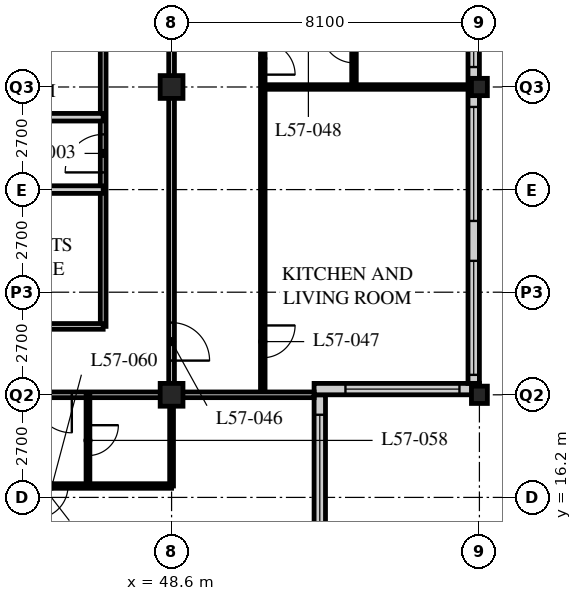
"""IFC4 building model, lengths in metres.
Left out: names, types, materials, properties, quantities, classifications, styles, units other than length and angle.
Written with IfcOpenShell. Run it as: python <this file> out.ifc"""

import sys

from ifc_helpers import new_model, si_unit, direction, frame, frame_2d, origin, origin_2d, place, context, subcontext, project, spatial, rectangle, hollow_rectangle, i_section, extrude, element, fill, save


model = new_model("IFC4")
c1 = context("Model", 3, precision=1e-05, world=origin(), true_north=direction((0.0, 1.0)))
c2 = subcontext(c1, "Body", "Model", "MODEL_VIEW")
j1 = project(units=[si_unit("LENGTHUNIT", "METRE"), si_unit("PLANEANGLEUNIT", "RADIAN")], contexts=[c1])
p1 = place(None, origin())
s1 = spatial("IfcSite", under=j1, at=p1, CompositionType="ELEMENT")
p2 = place(p1, origin())
s2 = spatial("IfcBuilding", under=s1, at=p2, CompositionType="ELEMENT")
p3 = place(p2, frame((0.0, 0.0, 220.8)))
s3 = spatial("IfcBuildingStorey", under=s2, at=p3, CompositionType="ELEMENT", Elevation=220.8)
for number, where, z_axis, x_axis in (
    (1, (48.6, 18.9, 0.0), (0.0, 0.0, 1.0), (1.0, 0.0, 0.0)),
    (2, (48.6, 27.0, 0.0), (0.0, 0.0, 1.0), (1.0, 0.0, 0.0)),
):
    element("IfcColumn", number, at=place(p3, frame(where, z_axis=z_axis, x_axis=x_axis)), inside=s3, PredefinedType="COLUMN", context=c2, shape_type="SweptSolid", body=[
        extrude(hollow_rectangle(XDim=0.6, YDim=0.6, WallThickness=0.05, at=origin_2d()), origin(), (0.0, 0.0, 1.0), 3.6),
    ])
for number, where, z_axis, x_axis in (
    (3, (56.7, 18.9, 0.0), (0.0, 0.0, 1.0), (1.0, 0.0, 0.0)),
    (4, (56.7, 27.0, 0.0), (0.0, 0.0, 1.0), (1.0, 0.0, 0.0)),
):
    element("IfcColumn", number, at=place(p3, frame(where, z_axis=z_axis, x_axis=x_axis)), inside=s3, PredefinedType="COLUMN", context=c2, shape_type="SweptSolid", body=[
        extrude(i_section(OverallWidth=0.418, OverallDepth=0.456, WebThickness=0.042, FlangeThickness=0.067, FilletRadius=0.015, at=origin_2d()), origin(), (0.0, 0.0, 1.0), 3.6),
    ])
p4 = place(p3, frame((52.5, 15.15, 0.0), z_axis=(0.0, 0.0, 1.0), x_axis=(0.0, 1.0, 0.0)))
e5 = element("IfcWall", 5, at=p4, inside=s3, PredefinedType="SOLIDWALL", context=c2, shape_type="SweptSolid", body=[
    extrude(rectangle(XDim=3.75, YDim=0.3, at=frame_2d((1.875, 0.0))), origin(), (0.0, 0.0, 1.0), 3.39),
])
p5 = place(p4, frame((0.225, 0.0, 0.6)))
e6 = element("IfcOpeningElement", 6, at=p5, cuts=e5, PredefinedType="OPENING", context=c2, shape_type="SweptSolid", body=[
    extrude(rectangle(XDim=3.0, YDim=2.0, at=frame_2d((1.5, 1.0))), frame((0.0, 0.16, 0.0), z_axis=(0.0, -1.0, 0.0), x_axis=(1.0, 0.0, 0.0)), (0.0, 0.0, 1.0), 0.32),
])
p6 = place(p3, frame((52.35, 19.05, 0.0), z_axis=(0.0, 0.0, 1.0), x_axis=(1.0, 0.0, 0.0)))
e7 = element("IfcWall", 7, at=p6, inside=s3, PredefinedType="SOLIDWALL", context=c2, shape_type="SweptSolid", body=[
    extrude(rectangle(XDim=4.35, YDim=0.3, at=frame_2d((2.175, 0.0))), origin(), (0.0, 0.0, 1.0), 3.39),
])
p7 = place(p6, frame((0.825, 0.0, 0.6)))
e8 = element("IfcOpeningElement", 8, at=p7, cuts=e7, PredefinedType="OPENING", context=c2, shape_type="SweptSolid", body=[
    extrude(rectangle(XDim=3.0, YDim=2.0, at=frame_2d((1.5, 1.0))), frame((0.0, 0.16, 0.0), z_axis=(0.0, -1.0, 0.0), x_axis=(1.0, 0.0, 0.0)), (0.0, 0.0, 1.0), 0.32),
])
p8 = place(p3, frame((56.55, 19.2, 0.0), z_axis=(0.0, 0.0, 1.0), x_axis=(0.0, 1.0, 0.0)))
e9 = element("IfcWall", 9, at=p8, inside=s3, PredefinedType="SOLIDWALL", context=c2, shape_type="SweptSolid", body=[
    extrude(rectangle(XDim=32.1, YDim=0.3, at=frame_2d((16.05, 0.0))), origin(), (0.0, 0.0, 1.0), 3.39),
])
p9 = place(p8, frame((0.225, 0.0, 0.6)))
e10 = element("IfcOpeningElement", 10, at=p9, cuts=e9, PredefinedType="OPENING", context=c2, shape_type="SweptSolid", body=[
    extrude(rectangle(XDim=3.0, YDim=2.0, at=frame_2d((1.5, 1.0))), frame((0.0, 0.16, 0.0), z_axis=(0.0, -1.0, 0.0), x_axis=(1.0, 0.0, 0.0)), (0.0, 0.0, 1.0), 0.32),
])
p10 = place(p8, frame((4.275, 0.0, 0.6)))
e11 = element("IfcOpeningElement", 11, at=p10, cuts=e9, PredefinedType="OPENING", context=c2, shape_type="SweptSolid", body=[
    extrude(rectangle(XDim=3.0, YDim=2.0, at=frame_2d((1.5, 1.0))), frame((0.0, 0.16, 0.0), z_axis=(0.0, -1.0, 0.0), x_axis=(1.0, 0.0, 0.0)), (0.0, 0.0, 1.0), 0.32),
])
p11 = place(p8, frame((8.325, 0.0, 0.6)))
e12 = element("IfcOpeningElement", 12, at=p11, cuts=e9, PredefinedType="OPENING", context=c2, shape_type="SweptSolid", body=[
    extrude(rectangle(XDim=3.0, YDim=2.0, at=frame_2d((1.5, 1.0))), frame((0.0, 0.16, 0.0), z_axis=(0.0, -1.0, 0.0), x_axis=(1.0, 0.0, 0.0)), (0.0, 0.0, 1.0), 0.32),
])
p12 = place(p8, frame((12.375, 0.0, 0.6)))
e13 = element("IfcOpeningElement", 13, at=p12, cuts=e9, PredefinedType="OPENING", context=c2, shape_type="SweptSolid", body=[
    extrude(rectangle(XDim=3.0, YDim=2.0, at=frame_2d((1.5, 1.0))), frame((0.0, 0.16, 0.0), z_axis=(0.0, -1.0, 0.0), x_axis=(1.0, 0.0, 0.0)), (0.0, 0.0, 1.0), 0.32),
])
p13 = place(p8, frame((16.425, 0.0, 0.6)))
e14 = element("IfcOpeningElement", 14, at=p13, cuts=e9, PredefinedType="OPENING", context=c2, shape_type="SweptSolid", body=[
    extrude(rectangle(XDim=3.0, YDim=2.0, at=frame_2d((1.5, 1.0))), frame((0.0, 0.16, 0.0), z_axis=(0.0, -1.0, 0.0), x_axis=(1.0, 0.0, 0.0)), (0.0, 0.0, 1.0), 0.32),
])
p14 = place(p8, frame((20.475, 0.0, 0.6)))
e15 = element("IfcOpeningElement", 15, at=p14, cuts=e9, PredefinedType="OPENING", context=c2, shape_type="SweptSolid", body=[
    extrude(rectangle(XDim=3.0, YDim=2.0, at=frame_2d((1.5, 1.0))), frame((0.0, 0.16, 0.0), z_axis=(0.0, -1.0, 0.0), x_axis=(1.0, 0.0, 0.0)), (0.0, 0.0, 1.0), 0.32),
])
p15 = place(p8, frame((24.525, 0.0, 0.6)))
e16 = element("IfcOpeningElement", 16, at=p15, cuts=e9, PredefinedType="OPENING", context=c2, shape_type="SweptSolid", body=[
    extrude(rectangle(XDim=3.0, YDim=2.0, at=frame_2d((1.5, 1.0))), frame((0.0, 0.16, 0.0), z_axis=(0.0, -1.0, 0.0), x_axis=(1.0, 0.0, 0.0)), (0.0, 0.0, 1.0), 0.32),
])
p16 = place(p8, frame((28.575, 0.0, 0.6)))
e17 = element("IfcOpeningElement", 17, at=p16, cuts=e9, PredefinedType="OPENING", context=c2, shape_type="SweptSolid", body=[
    extrude(rectangle(XDim=3.0, YDim=2.0, at=frame_2d((1.5, 1.0))), frame((0.0, 0.16, 0.0), z_axis=(0.0, -1.0, 0.0), x_axis=(1.0, 0.0, 0.0)), (0.0, 0.0, 1.0), 0.32),
])
p17 = place(p3, frame((12.15, 18.9, 0.0), z_axis=(0.0, 0.0, 1.0), x_axis=(1.0, 0.0, 0.0)))
e18 = element("IfcWall", 18, at=p17, inside=s3, PredefinedType="PARTITIONING", context=c2, shape_type="SweptSolid", body=[
    extrude(rectangle(XDim=36.45, YDim=0.15, at=frame_2d((18.225, 0.0))), origin(), (0.0, 0.0, 1.0), 2.628),
])
p18 = place(p17, frame((4.95, 0.0, 0.0)))
e19 = element("IfcOpeningElement", 19, at=p18, cuts=e18, PredefinedType="OPENING", context=c2, shape_type="SweptSolid", body=[
    extrude(rectangle(XDim=1.0, YDim=2.1, at=frame_2d((0.5, 1.05))), frame((0.0, 0.085, 0.0), z_axis=(0.0, -1.0, 0.0), x_axis=(1.0, 0.0, 0.0)), (0.0, 0.0, 1.0), 0.17),
])
p19 = place(p17, frame((22.6, 0.0, 0.0)))
e20 = element("IfcOpeningElement", 20, at=p19, cuts=e18, PredefinedType="OPENING", context=c2, shape_type="SweptSolid", body=[
    extrude(rectangle(XDim=1.0, YDim=2.1, at=frame_2d((0.5, 1.05))), frame((0.0, 0.085, 0.0), z_axis=(0.0, -1.0, 0.0), x_axis=(1.0, 0.0, 0.0)), (0.0, 0.0, 1.0), 0.17),
])
p20 = place(p17, frame((25.0, 0.0, 0.0)))
e21 = element("IfcOpeningElement", 21, at=p20, cuts=e18, PredefinedType="OPENING", context=c2, shape_type="SweptSolid", body=[
    extrude(rectangle(XDim=1.0, YDim=2.1, at=frame_2d((0.5, 1.05))), frame((0.0, 0.085, 0.0), z_axis=(0.0, -1.0, 0.0), x_axis=(1.0, 0.0, 0.0)), (0.0, 0.0, 1.0), 0.17),
])
p21 = place(p17, frame((30.7, 0.0, 0.0)))
e22 = element("IfcOpeningElement", 22, at=p21, cuts=e18, PredefinedType="OPENING", context=c2, shape_type="SweptSolid", body=[
    extrude(rectangle(XDim=1.0, YDim=2.1, at=frame_2d((0.5, 1.05))), frame((0.0, 0.085, 0.0), z_axis=(0.0, -1.0, 0.0), x_axis=(1.0, 0.0, 0.0)), (0.0, 0.0, 1.0), 0.17),
])
p22 = place(p17, frame((1.525, 0.0, 0.0)))
e23 = element("IfcOpeningElement", 23, at=p22, cuts=e18, PredefinedType="OPENING", context=c2, shape_type="SweptSolid", body=[
    extrude(rectangle(XDim=1.0, YDim=2.1, at=frame_2d((0.5, 1.05))), frame((0.0, 0.085, 0.0), z_axis=(0.0, -1.0, 0.0), x_axis=(1.0, 0.0, 0.0)), (0.0, 0.0, 1.0), 0.17),
])
p23 = place(p17, frame((32.825, 0.0, 0.0)))
e24 = element("IfcOpeningElement", 24, at=p23, cuts=e18, PredefinedType="OPENING", context=c2, shape_type="SweptSolid", body=[
    extrude(rectangle(XDim=1.0, YDim=2.1, at=frame_2d((0.5, 1.05))), frame((0.0, 0.085, 0.0), z_axis=(0.0, -1.0, 0.0), x_axis=(1.0, 0.0, 0.0)), (0.0, 0.0, 1.0), 0.17),
])
p24 = place(p3, frame((48.6, 18.9, 0.0), z_axis=(0.0, 0.0, 1.0), x_axis=(0.0, 1.0, 0.0)))
e25 = element("IfcWall", 25, at=p24, inside=s3, PredefinedType="PARTITIONING", context=c2, shape_type="SweptSolid", body=[
    extrude(rectangle(XDim=24.3, YDim=0.15, at=frame_2d((12.15, 0.0))), origin(), (0.0, 0.0, 1.0), 2.628),
])
p25 = place(p24, frame((0.9, 0.0, 0.0)))
e26 = element("IfcOpeningElement", 26, at=p25, cuts=e25, PredefinedType="OPENING", context=c2, shape_type="SweptSolid", body=[
    extrude(rectangle(XDim=1.0, YDim=2.1, at=frame_2d((0.5, 1.05))), frame((0.0, 0.085, 0.0), z_axis=(0.0, -1.0, 0.0), x_axis=(1.0, 0.0, 0.0)), (0.0, 0.0, 1.0), 0.17),
])
p26 = place(p24, frame((20.95, 0.0, 0.0)))
e27 = element("IfcOpeningElement", 27, at=p26, cuts=e25, PredefinedType="OPENING", context=c2, shape_type="SweptSolid", body=[
    extrude(rectangle(XDim=1.0, YDim=2.1, at=frame_2d((0.5, 1.05))), frame((0.0, 0.085, 0.0), z_axis=(0.0, -1.0, 0.0), x_axis=(1.0, 0.0, 0.0)), (0.0, 0.0, 1.0), 0.17),
])
p27 = place(p3, frame((46.8, 20.7, 0.0), z_axis=(0.0, 0.0, 1.0), x_axis=(0.0, 1.0, 0.0)))
e28 = element("IfcWall", 28, at=p27, inside=s3, PredefinedType="PARTITIONING", context=c2, shape_type="SweptSolid", body=[
    extrude(rectangle(XDim=19.8, YDim=0.15, at=frame_2d((9.9, 0.0))), origin(), (0.0, 0.0, 1.0), 3.39),
])
p28 = place(p27, frame((4.052, 0.0, 0.0)))
e29 = element("IfcOpeningElement", 29, at=p28, cuts=e28, PredefinedType="OPENING", context=c2, shape_type="SweptSolid", body=[
    extrude(rectangle(XDim=1.0, YDim=2.1, at=frame_2d((0.5, 1.05))), frame((0.0, 0.085, 0.0), z_axis=(0.0, -1.0, 0.0), x_axis=(1.0, 0.0, 0.0)), (0.0, 0.0, 1.0), 0.17),
])
p29 = place(p27, frame((8.102, 0.0, 0.0)))
e30 = element("IfcOpeningElement", 30, at=p29, cuts=e28, PredefinedType="OPENING", context=c2, shape_type="SweptSolid", body=[
    extrude(rectangle(XDim=1.0, YDim=2.1, at=frame_2d((0.5, 1.05))), frame((0.0, 0.085, 0.0), z_axis=(0.0, -1.0, 0.0), x_axis=(1.0, 0.0, 0.0)), (0.0, 0.0, 1.0), 0.17),
])
p30 = place(p27, frame((13.502, 0.0, 0.0)))
e31 = element("IfcOpeningElement", 31, at=p30, cuts=e28, PredefinedType="OPENING", context=c2, shape_type="SweptSolid", body=[
    extrude(rectangle(XDim=1.0, YDim=2.1, at=frame_2d((0.5, 1.05))), frame((0.0, 0.085, 0.0), z_axis=(0.0, -1.0, 0.0), x_axis=(1.0, 0.0, 0.0)), (0.0, 0.0, 1.0), 0.17),
])
p31 = place(p27, frame((17.552, 0.0, 0.0)))
e32 = element("IfcOpeningElement", 32, at=p31, cuts=e28, PredefinedType="OPENING", context=c2, shape_type="SweptSolid", body=[
    extrude(rectangle(XDim=1.0, YDim=2.1, at=frame_2d((0.5, 1.05))), frame((0.0, 0.085, 0.0), z_axis=(0.0, -1.0, 0.0), x_axis=(1.0, 0.0, 0.0)), (0.0, 0.0, 1.0), 0.17),
])
p32 = place(p3, frame((29.56, 20.7, 0.0), z_axis=(0.0, 0.0, 1.0), x_axis=(1.0, 0.0, 0.0)))
e33 = element("IfcWall", 33, at=p32, inside=s3, PredefinedType="PARTITIONING", context=c2, shape_type="SweptSolid", body=[
    extrude(rectangle(XDim=17.24, YDim=0.15, at=frame_2d((8.62, 0.0))), origin(), (0.0, 0.0, 1.0), 3.39),
])
p33 = place(p32, frame((4.965, 0.0, 0.0)))
e34 = element("IfcOpeningElement", 34, at=p33, cuts=e33, PredefinedType="OPENING", context=c2, shape_type="SweptSolid", body=[
    extrude(rectangle(XDim=1.0, YDim=2.1, at=frame_2d((0.5, 1.05))), frame((0.0, 0.085, 0.0), z_axis=(0.0, -1.0, 0.0), x_axis=(1.0, 0.0, 0.0)), (0.0, 0.0, 1.0), 0.17),
])
p34 = place(p32, frame((11.412, 0.0, 0.0)))
e35 = element("IfcOpeningElement", 35, at=p34, cuts=e33, PredefinedType="OPENING", context=c2, shape_type="SweptSolid", body=[
    extrude(rectangle(XDim=1.0, YDim=2.1, at=frame_2d((0.5, 1.05))), frame((0.0, 0.085, 0.0), z_axis=(0.0, -1.0, 0.0), x_axis=(1.0, 0.0, 0.0)), (0.0, 0.0, 1.0), 0.17),
])
p35 = place(p32, frame((14.562, 0.0, 0.0)))
e36 = element("IfcOpeningElement", 36, at=p35, cuts=e33, PredefinedType="OPENING", context=c2, shape_type="SweptSolid", body=[
    extrude(rectangle(XDim=1.0, YDim=2.1, at=frame_2d((0.5, 1.05))), frame((0.0, 0.085, 0.0), z_axis=(0.0, -1.0, 0.0), x_axis=(1.0, 0.0, 0.0)), (0.0, 0.0, 1.0), 0.17),
])
for number, where, z_axis, x_axis in (
    (37, (46.8, 26.205, 0.0), (0.0, 0.0, 1.0), (-1.0, 0.0, 0.0)),
    (38, (40.5, 24.3, 0.0), (0.0, 0.0, 1.0), (1.0, 0.0, 0.0)),
):
    element("IfcWall", number, at=place(p3, frame(where, z_axis=z_axis, x_axis=x_axis)), inside=s3, PredefinedType="SOLIDWALL", context=c2, shape_type="SweptSolid", body=[
        extrude(rectangle(XDim=6.3, YDim=0.2, at=frame_2d((3.15, 0.0))), origin(), (0.0, 0.0, 1.0), 3.39),
    ])
p36 = place(p3, frame((51.0, 18.9, 0.0), z_axis=(0.0, 0.0, 1.0), x_axis=(0.0, 1.0, 0.0)))
e39 = element("IfcWall", 39, at=p36, inside=s3, PredefinedType="PARTITIONING", context=c2, shape_type="SweptSolid", body=[
    extrude(rectangle(XDim=20.25, YDim=0.12, at=frame_2d((10.125, 0.0))), origin(), (0.0, 0.0, 1.0), 3.39),
])
p37 = place(p36, frame((0.975, 0.0, 0.0)))
e40 = element("IfcOpeningElement", 40, at=p37, cuts=e39, PredefinedType="OPENING", context=c2, shape_type="SweptSolid", body=[
    extrude(rectangle(XDim=0.85, YDim=2.1, at=frame_2d((0.425, 1.05))), frame((0.0, 0.07, 0.0), z_axis=(0.0, -1.0, 0.0), x_axis=(1.0, 0.0, 0.0)), (0.0, 0.0, 1.0), 0.14),
])
p38 = place(p36, frame((8.425, 0.0, 0.0)))
e41 = element("IfcOpeningElement", 41, at=p38, cuts=e39, PredefinedType="OPENING", context=c2, shape_type="SweptSolid", body=[
    extrude(rectangle(XDim=0.85, YDim=2.1, at=frame_2d((0.425, 1.05))), frame((0.0, 0.07, 0.0), z_axis=(0.0, -1.0, 0.0), x_axis=(1.0, 0.0, 0.0)), (0.0, 0.0, 1.0), 0.14),
])
p39 = place(p36, frame((12.475, 0.0, 0.0)))
e42 = element("IfcOpeningElement", 42, at=p39, cuts=e39, PredefinedType="OPENING", context=c2, shape_type="SweptSolid", body=[
    extrude(rectangle(XDim=0.85, YDim=2.1, at=frame_2d((0.425, 1.05))), frame((0.0, 0.07, 0.0), z_axis=(0.0, -1.0, 0.0), x_axis=(1.0, 0.0, 0.0)), (0.0, 0.0, 1.0), 0.14),
])
p40 = place(p36, frame((16.525, 0.0, 0.0)))
e43 = element("IfcOpeningElement", 43, at=p40, cuts=e39, PredefinedType="OPENING", context=c2, shape_type="SweptSolid", body=[
    extrude(rectangle(XDim=0.85, YDim=2.1, at=frame_2d((0.425, 1.05))), frame((0.0, 0.07, 0.0), z_axis=(0.0, -1.0, 0.0), x_axis=(1.0, 0.0, 0.0)), (0.0, 0.0, 1.0), 0.14),
])
p41 = place(p3, frame((51.0, 27.0, 0.0), z_axis=(0.0, 0.0, 1.0), x_axis=(1.0, 0.0, 0.0)))
e44 = element("IfcWall", 44, at=p41, inside=s3, PredefinedType="PARTITIONING", context=c2, shape_type="SweptSolid", body=[
    extrude(rectangle(XDim=5.4, YDim=0.12, at=frame_2d((2.7, 0.0))), origin(), (0.0, 0.0, 1.0), 2.628),
])
p42 = place(p3, frame((44.55, 16.5, 0.0), z_axis=(0.0, 0.0, 1.0), x_axis=(1.0, 0.0, 0.0)))
e45 = element("IfcWall", 45, at=p42, inside=s3, PredefinedType="PARTITIONING", context=c2, shape_type="SweptSolid", body=[
    extrude(rectangle(XDim=4.05, YDim=0.12, at=frame_2d((2.025, 0.0))), origin(), (0.0, 0.0, 1.0), 3.39),
])
p43 = place(p42, frame((0.475, 0.0, 0.0)))
e46 = element("IfcOpeningElement", 46, at=p43, cuts=e45, PredefinedType="OPENING", context=c2, shape_type="SweptSolid", body=[
    extrude(rectangle(XDim=0.85, YDim=2.1, at=frame_2d((0.425, 1.05))), frame((0.0, 0.07, 0.0), z_axis=(0.0, -1.0, 0.0), x_axis=(1.0, 0.0, 0.0)), (0.0, 0.0, 1.0), 0.14),
])
p44 = place(p3, frame((46.4, 18.9, 0.0), z_axis=(0.0, 0.0, 1.0), x_axis=(0.0, -1.0, 0.0)))
e47 = element("IfcWall", 47, at=p44, inside=s3, PredefinedType="PARTITIONING", context=c2, shape_type="SweptSolid", body=[
    extrude(rectangle(XDim=2.4, YDim=0.1, at=frame_2d((1.2, 0.0))), origin(), (0.0, 0.0, 1.0), 3.39),
])
p45 = place(p44, frame((0.8, 0.0, 0.0)))
e48 = element("IfcOpeningElement", 48, at=p45, cuts=e47, PredefinedType="OPENING", context=c2, shape_type="SweptSolid", body=[
    extrude(rectangle(XDim=0.8, YDim=2.1, at=frame_2d((0.4, 1.05))), frame((0.0, 0.06, 0.0), z_axis=(0.0, -1.0, 0.0), x_axis=(1.0, 0.0, 0.0)), (0.0, 0.0, 1.0), 0.12),
])
p46 = place(p3, frame((48.6, 18.9, 0.0), z_axis=(0.0, 0.0, 1.0), x_axis=(0.0, -1.0, 0.0)))
e49 = element("IfcWall", 49, at=p46, inside=s3, PredefinedType="PARTITIONING", context=c2, shape_type="SweptSolid", body=[
    extrude(rectangle(XDim=2.4, YDim=0.1, at=frame_2d((1.2, 0.0))), origin(), (0.0, 0.0, 1.0), 2.628),
])
p47 = place(p3, frame((48.6, 18.9, 0.0), z_axis=(0.0, 0.0, 1.0), x_axis=(1.0, 0.0, 0.0)))
e50 = element("IfcWall", 50, at=p47, inside=s3, PredefinedType="PARTITIONING", context=c2, shape_type="SweptSolid", body=[
    extrude(rectangle(XDim=3.75, YDim=0.15, at=frame_2d((1.875, 0.0))), origin(), (0.0, 0.0, 1.0), 2.628),
])
p48 = place(p3, frame((53.4, 28.76, 0.0), z_axis=(0.0, 0.0, 1.0), x_axis=(0.0, -1.0, 0.0)))
e51 = element("IfcWall", 51, at=p48, inside=s3, PredefinedType="PARTITIONING", context=c2, shape_type="SweptSolid", body=[
    extrude(rectangle(XDim=1.76, YDim=0.12, at=frame_2d((0.88, 0.0))), origin(), (0.0, 0.0, 1.0), 3.39),
])
p49 = place(p48, frame((0.275, 0.0, 0.0)))
e52 = element("IfcOpeningElement", 52, at=p49, cuts=e51, PredefinedType="OPENING", context=c2, shape_type="SweptSolid", body=[
    extrude(rectangle(XDim=0.85, YDim=2.1, at=frame_2d((0.425, 1.05))), frame((0.0, 0.07, 0.0), z_axis=(0.0, -1.0, 0.0), x_axis=(1.0, 0.0, 0.0)), (0.0, 0.0, 1.0), 0.14),
])
p50 = place(p5, origin())
e53 = element("IfcWindow", 53, at=p50, inside=s3, PartitioningType="SINGLE_PANEL", PredefinedType="WINDOW", context=c2, shape_type="SweptSolid", body=[
    extrude(rectangle(XDim=3.0, YDim=2.0, at=frame_2d((1.5, 1.0))), frame((0.0, 0.03, 0.0), z_axis=(0.0, -1.0, 0.0), x_axis=(1.0, 0.0, 0.0)), (0.0, 0.0, 1.0), 0.06),
])
fill(e6, e53)
p51 = place(p7, origin())
e54 = element("IfcWindow", 54, at=p51, inside=s3, PartitioningType="SINGLE_PANEL", PredefinedType="WINDOW", context=c2, shape_type="SweptSolid", body=[
    extrude(rectangle(XDim=3.0, YDim=2.0, at=frame_2d((1.5, 1.0))), frame((0.0, 0.03, 0.0), z_axis=(0.0, -1.0, 0.0), x_axis=(1.0, 0.0, 0.0)), (0.0, 0.0, 1.0), 0.06),
])
fill(e8, e54)
p52 = place(p9, origin())
e55 = element("IfcWindow", 55, at=p52, inside=s3, PartitioningType="SINGLE_PANEL", PredefinedType="WINDOW", context=c2, shape_type="SweptSolid", body=[
    extrude(rectangle(XDim=3.0, YDim=2.0, at=frame_2d((1.5, 1.0))), frame((0.0, 0.03, 0.0), z_axis=(0.0, -1.0, 0.0), x_axis=(1.0, 0.0, 0.0)), (0.0, 0.0, 1.0), 0.06),
])
fill(e10, e55)
p53 = place(p10, origin())
e56 = element("IfcWindow", 56, at=p53, inside=s3, PartitioningType="SINGLE_PANEL", PredefinedType="WINDOW", context=c2, shape_type="SweptSolid", body=[
    extrude(rectangle(XDim=3.0, YDim=2.0, at=frame_2d((1.5, 1.0))), frame((0.0, 0.03, 0.0), z_axis=(0.0, -1.0, 0.0), x_axis=(1.0, 0.0, 0.0)), (0.0, 0.0, 1.0), 0.06),
])
fill(e11, e56)
p54 = place(p11, origin())
e57 = element("IfcWindow", 57, at=p54, inside=s3, PartitioningType="SINGLE_PANEL", PredefinedType="WINDOW", context=c2, shape_type="SweptSolid", body=[
    extrude(rectangle(XDim=3.0, YDim=2.0, at=frame_2d((1.5, 1.0))), frame((0.0, 0.03, 0.0), z_axis=(0.0, -1.0, 0.0), x_axis=(1.0, 0.0, 0.0)), (0.0, 0.0, 1.0), 0.06),
])
fill(e12, e57)
p55 = place(p28, origin())
e58 = element("IfcDoor", 58, at=p55, inside=s3, OperationType="SINGLE_SWING_LEFT", PredefinedType="DOOR", context=c2, shape_type="SweptSolid", body=[
    extrude(rectangle(XDim=1.0, YDim=2.1, at=frame_2d((0.5, 1.05))), frame((0.0, 0.025, 0.0), z_axis=(0.0, -1.0, 0.0), x_axis=(1.0, 0.0, 0.0)), (0.0, 0.0, 1.0), 0.05),
])
fill(e29, e58)
p56 = place(p25, origin())
e59 = element("IfcDoor", 59, at=p56, inside=s3, OperationType="SINGLE_SWING_RIGHT", PredefinedType="DOOR", context=c2, shape_type="SweptSolid", body=[
    extrude(rectangle(XDim=1.0, YDim=2.1, at=frame_2d((0.5, 1.05))), frame((0.0, 0.025, 0.0), z_axis=(0.0, -1.0, 0.0), x_axis=(1.0, 0.0, 0.0)), (0.0, 0.0, 1.0), 0.05),
])
fill(e26, e59)
p57 = place(p37, origin())
e60 = element("IfcDoor", 60, at=p57, inside=s3, OperationType="SINGLE_SWING_LEFT", PredefinedType="DOOR", context=c2, shape_type="SweptSolid", body=[
    extrude(rectangle(XDim=0.85, YDim=2.1, at=frame_2d((0.425, 1.05))), frame((0.0, 0.025, 0.0), z_axis=(0.0, -1.0, 0.0), x_axis=(1.0, 0.0, 0.0)), (0.0, 0.0, 1.0), 0.05),
])
fill(e40, e60)
p58 = place(p38, origin())
e61 = element("IfcDoor", 61, at=p58, inside=s3, OperationType="SINGLE_SWING_RIGHT", PredefinedType="DOOR", context=c2, shape_type="SweptSolid", body=[
    extrude(rectangle(XDim=0.85, YDim=2.1, at=frame_2d((0.425, 1.05))), frame((0.0, 0.025, 0.0), z_axis=(0.0, -1.0, 0.0), x_axis=(1.0, 0.0, 0.0)), (0.0, 0.0, 1.0), 0.05),
])
fill(e41, e61)
p59 = place(p45, origin())
e62 = element("IfcDoor", 62, at=p59, inside=s3, OperationType="SINGLE_SWING_LEFT", PredefinedType="DOOR", context=c2, shape_type="SweptSolid", body=[
    extrude(rectangle(XDim=0.8, YDim=2.1, at=frame_2d((0.4, 1.05))), frame((0.0, 0.025, 0.0), z_axis=(0.0, -1.0, 0.0), x_axis=(1.0, 0.0, 0.0)), (0.0, 0.0, 1.0), 0.05),
])
fill(e48, e62)
p60 = place(p23, origin())
e63 = element("IfcDoor", 63, at=p60, inside=s3, OperationType="SINGLE_SWING_LEFT", PredefinedType="DOOR", context=c2, shape_type="SweptSolid", body=[
    extrude(rectangle(XDim=1.0, YDim=2.1, at=frame_2d((0.5, 1.05))), frame((0.0, 0.025, 0.0), z_axis=(0.0, -1.0, 0.0), x_axis=(1.0, 0.0, 0.0)), (0.0, 0.0, 1.0), 0.05),
])
fill(e24, e63)
p61 = place(p43, origin())
e64 = element("IfcDoor", 64, at=p61, inside=s3, OperationType="SINGLE_SWING_RIGHT", PredefinedType="DOOR", context=c2, shape_type="SweptSolid", body=[
    extrude(rectangle(XDim=0.85, YDim=2.1, at=frame_2d((0.425, 1.05))), frame((0.0, 0.025, 0.0), z_axis=(0.0, -1.0, 0.0), x_axis=(1.0, 0.0, 0.0)), (0.0, 0.0, 1.0), 0.05),
])
fill(e46, e64)
p62 = place(p49, origin())
e65 = element("IfcDoor", 65, at=p62, inside=s3, OperationType="SINGLE_SWING_RIGHT", PredefinedType="DOOR", context=c2, shape_type="SweptSolid", body=[
    extrude(rectangle(XDim=0.85, YDim=2.1, at=frame_2d((0.425, 1.05))), frame((0.0, 0.025, 0.0), z_axis=(0.0, -1.0, 0.0), x_axis=(1.0, 0.0, 0.0)), (0.0, 0.0, 1.0), 0.05),
])
fill(e52, e65)
save(model, sys.argv[1])
